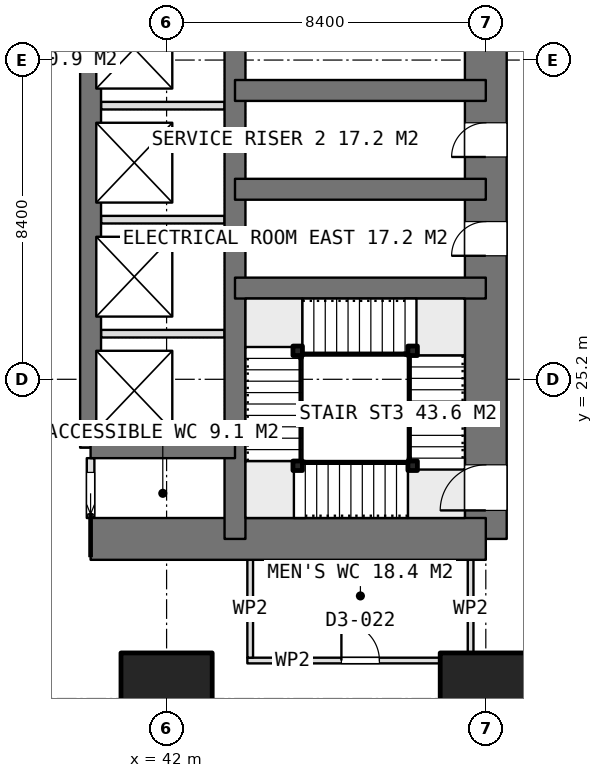
"""IFC4 building model, lengths in metres.
Left out: names, types, materials, properties, quantities, classifications, styles, units other than length and angle.
Written with IfcOpenShell. Run it as: python <this file> out.ifc"""

import sys

from ifc_helpers import new_model, si_unit, direction, frame, frame_2d, origin, origin_2d, place, context, subcontext, project, spatial, rectangle, extrude, element, fill, save


model = new_model("IFC4")
c1 = context("Model", 3, precision=1e-05, world=origin(), true_north=direction((0.0, 1.0)))
c2 = subcontext(c1, "Body", "Model", "MODEL_VIEW")
j1 = project(units=[si_unit("LENGTHUNIT", "METRE"), si_unit("PLANEANGLEUNIT", "RADIAN")], contexts=[c1])
p1 = place(None, origin())
s1 = spatial("IfcSite", under=j1, at=p1, CompositionType="ELEMENT")
p2 = place(p1, origin())
s2 = spatial("IfcBuilding", under=s1, at=p2, CompositionType="ELEMENT")
p3 = place(p2, frame((0.0, 0.0, 15.4)))
s3 = spatial("IfcBuildingStorey", under=s2, at=p3, CompositionType="ELEMENT", Elevation=15.4)
p4 = place(p3, frame((40.0, 21.0, 0.0), z_axis=(0.0, 0.0, 1.0), x_axis=(1.0, 0.0, 0.0)))
e1 = element("IfcWall", 1, at=p4, inside=s3, PredefinedType="SHEAR", context=c2, shape_type="SweptSolid", body=[
    extrude(rectangle(XDim=10.4, YDim=1.1, at=frame_2d((5.2, 0.0))), origin(), (0.0, 0.0, 1.0), 5.0),
])
p5 = place(p3, frame((50.4, 21.0, 0.0), z_axis=(0.0, 0.0, 1.0), x_axis=(0.0, 1.0, 0.0)))
e2 = element("IfcWall", 2, at=p5, inside=s3, PredefinedType="SHEAR", context=c2, shape_type="SweptSolid", body=[
    extrude(rectangle(XDim=25.2, YDim=1.1, at=frame_2d((12.6, 0.0))), origin(), (0.0, 0.0, 1.0), 5.0),
])
p6 = place(p5, frame((16.2, 0.0, 0.0)))
e3 = element("IfcOpeningElement", 3, at=p6, cuts=e2, PredefinedType="OPENING", context=c2, shape_type="SweptSolid", body=[
    extrude(rectangle(XDim=1.2, YDim=2.1, at=frame_2d((0.6, 1.05))), frame((0.0, 0.56, 0.0), z_axis=(0.0, -1.0, 0.0), x_axis=(1.0, 0.0, 0.0)), (0.0, 0.0, 1.0), 1.12),
])
p7 = place(p5, frame((10.05, 0.0, 0.0)))
e4 = element("IfcOpeningElement", 4, at=p7, cuts=e2, PredefinedType="OPENING", context=c2, shape_type="SweptSolid", body=[
    extrude(rectangle(XDim=0.9, YDim=2.1, at=frame_2d((0.45, 1.05))), frame((0.0, 0.56, 0.0), z_axis=(0.0, -1.0, 0.0), x_axis=(1.0, 0.0, 0.0)), (0.0, 0.0, 1.0), 1.12),
])
p8 = place(p5, frame((7.45, 0.0, 0.0)))
e5 = element("IfcOpeningElement", 5, at=p8, cuts=e2, PredefinedType="OPENING", context=c2, shape_type="SweptSolid", body=[
    extrude(rectangle(XDim=0.9, YDim=2.1, at=frame_2d((0.45, 1.05))), frame((0.0, 0.56, 0.0), z_axis=(0.0, -1.0, 0.0), x_axis=(1.0, 0.0, 0.0)), (0.0, 0.0, 1.0), 1.12),
])
p9 = place(p5, frame((0.75, 0.0, 0.0)))
e6 = element("IfcOpeningElement", 6, at=p9, cuts=e2, PredefinedType="OPENING", context=c2, shape_type="SweptSolid", body=[
    extrude(rectangle(XDim=1.2, YDim=2.1, at=frame_2d((0.6, 1.05))), frame((0.0, 0.56, 0.0), z_axis=(0.0, -1.0, 0.0), x_axis=(1.0, 0.0, 0.0)), (0.0, 0.0, 1.0), 1.12),
])
p10 = place(p3, frame((43.8, 21.0, 0.0), z_axis=(0.0, 0.0, 1.0), x_axis=(0.0, 1.0, 0.0)))
e7 = element("IfcWall", 7, at=p10, inside=s3, PredefinedType="SHEAR", context=c2, shape_type="SweptSolid", body=[
    extrude(rectangle(XDim=25.2, YDim=0.55, at=frame_2d((12.6, 0.0))), origin(), (0.0, 0.0, 1.0), 5.0),
])
p11 = place(p3, frame((40.0, 23.4, 0.0), z_axis=(0.0, 0.0, 1.0), x_axis=(0.0, 1.0, 0.0)))
e8 = element("IfcWall", 8, at=p11, inside=s3, PredefinedType="SHEAR", context=c2, shape_type="SweptSolid", body=[
    extrude(rectangle(XDim=18.0, YDim=0.55, at=frame_2d((9.0, 0.0))), origin(), (0.0, 0.0, 1.0), 5.0),
])
p12 = place(p3, frame((40.0, 23.4, 0.0), z_axis=(0.0, 0.0, 1.0), x_axis=(1.0, 0.0, 0.0)))
e9 = element("IfcWall", 9, at=p12, inside=s3, PredefinedType="SHEAR", context=c2, shape_type="SweptSolid", body=[
    extrude(rectangle(XDim=3.8, YDim=0.55, at=frame_2d((1.9, 0.0))), origin(), (0.0, 0.0, 1.0), 5.0),
])
for number, where, z_axis, x_axis in (
    (10, (43.8, 27.6, 0.0), (0.0, 0.0, 1.0), (1.0, 0.0, 0.0)),
    (11, (43.8, 30.2, 0.0), (0.0, 0.0, 1.0), (1.0, 0.0, 0.0)),
    (12, (43.8, 32.8, 0.0), (0.0, 0.0, 1.0), (1.0, 0.0, 0.0)),
):
    element("IfcWall", number, at=place(p3, frame(where, z_axis=z_axis, x_axis=x_axis)), inside=s3, PredefinedType="SHEAR", context=c2, shape_type="SweptSolid", body=[
        extrude(rectangle(XDim=6.6, YDim=0.55, at=frame_2d((3.3, 0.0))), origin(), (0.0, 0.0, 1.0), 5.0),
    ])
for number, where, z_axis, x_axis in (
    (13, (42.0, 16.8, 0.0), (0.0, 0.0, 1.0), (1.0, 0.0, 0.0)),
    (14, (50.4, 16.8, 0.0), (0.0, 0.0, 1.0), (1.0, 0.0, 0.0)),
):
    element("IfcColumn", number, at=place(p3, frame(where, z_axis=z_axis, x_axis=x_axis)), inside=s3, PredefinedType="COLUMN", context=c2, shape_type="SweptSolid", body=[
        extrude(rectangle(XDim=2.4, YDim=2.4, at=origin_2d()), origin(), (0.0, 0.0, 1.0), 5.0),
    ])
for number, where, z_axis, x_axis in (
    (15, (40.275, 26.4, 0.0), (0.0, 0.0, 1.0), (1.0, 0.0, 0.0)),
    (16, (40.275, 29.4, 0.0), (0.0, 0.0, 1.0), (1.0, 0.0, 0.0)),
    (17, (40.275, 32.4, 0.0), (0.0, 0.0, 1.0), (1.0, 0.0, 0.0)),
):
    element("IfcWall", number, at=place(p3, frame(where, z_axis=z_axis, x_axis=x_axis)), inside=s3, PredefinedType="PARTITIONING", context=c2, shape_type="SweptSolid", body=[
        extrude(rectangle(XDim=3.25, YDim=0.2, at=frame_2d((1.625, 0.0))), origin(), (0.0, 0.0, 1.0), 4.7),
    ])
p13 = place(p3, frame((40.0, 21.55, 0.0), z_axis=(0.0, 0.0, 1.0), x_axis=(0.0, 1.0, 0.0)))
e18 = element("IfcWall", 18, at=p13, inside=s3, PredefinedType="PARTITIONING", context=c2, shape_type="SweptSolid", body=[
    extrude(rectangle(XDim=1.575, YDim=0.2, at=frame_2d((0.788, 0.0))), origin(), (0.0, 0.0, 1.0), 4.7),
])
p14 = place(p13, frame((0.1, 0.0, 0.0)))
e19 = element("IfcOpeningElement", 19, at=p14, cuts=e18, PredefinedType="OPENING", context=c2, shape_type="SweptSolid", body=[
    extrude(rectangle(XDim=1.1, YDim=2.1, at=frame_2d((0.55, 1.05))), frame((0.0, 0.11, 0.0), z_axis=(0.0, -1.0, 0.0), x_axis=(1.0, 0.0, 0.0)), (0.0, 0.0, 1.0), 0.22),
])
p15 = place(p3, frame((44.125, 17.8, 0.0), z_axis=(0.0, 0.0, 1.0), x_axis=(1.0, 0.0, 0.0)))
e20 = element("IfcWall", 20, at=p15, inside=s3, PredefinedType="PARTITIONING", context=c2, shape_type="SweptSolid", body=[
    extrude(rectangle(XDim=5.95, YDim=0.15, at=frame_2d((2.975, 0.0))), origin(), (0.0, 0.0, 1.0), 4.7),
])
p16 = place(p15, frame((2.475, 0.0, 0.0)))
e21 = element("IfcOpeningElement", 21, at=p16, cuts=e20, PredefinedType="OPENING", context=c2, shape_type="SweptSolid", body=[
    extrude(rectangle(XDim=1.0, YDim=2.1, at=frame_2d((0.5, 1.05))), frame((0.0, 0.085, 0.0), z_axis=(0.0, -1.0, 0.0), x_axis=(1.0, 0.0, 0.0)), (0.0, 0.0, 1.0), 0.17),
])
for number, where, z_axis, x_axis in (
    (22, (44.2, 17.875, 0.0), (0.0, 0.0, 1.0), (0.0, 1.0, 0.0)),
    (23, (50.0, 17.875, 0.0), (0.0, 0.0, 1.0), (0.0, 1.0, 0.0)),
):
    element("IfcWall", number, at=place(p3, frame(where, z_axis=z_axis, x_axis=x_axis)), inside=s3, PredefinedType="PARTITIONING", context=c2, shape_type="SweptSolid", body=[
        extrude(rectangle(XDim=2.575, YDim=0.15, at=frame_2d((1.288, 0.0))), origin(), (0.0, 0.0, 1.0), 4.7),
    ])
for number, where, z_axis, x_axis in (
    (24, (48.475, 22.925, 0.0), (0.0, 0.0, 1.0), (1.0, 0.0, 0.0)),
    (25, (45.45, 22.925, 0.0), (0.0, 0.0, 1.0), (1.0, 0.0, 0.0)),
    (26, (45.45, 25.95, 0.0), (0.0, 0.0, 1.0), (1.0, 0.0, 0.0)),
    (27, (48.475, 25.95, 0.0), (0.0, 0.0, 1.0), (1.0, 0.0, 0.0)),
):
    element("IfcColumn", number, at=place(p3, frame(where, z_axis=z_axis, x_axis=x_axis)), inside=s3, PredefinedType="COLUMN", context=c2, shape_type="SweptSolid", body=[
        extrude(rectangle(XDim=0.25, YDim=0.25, at=origin_2d()), origin(), (0.0, 0.0, 1.0), 5.0),
    ])
p17 = place(p7, origin())
e28 = element("IfcDoor", 28, at=p17, inside=s3, OperationType="SINGLE_SWING_LEFT", PredefinedType="DOOR", context=c2, shape_type="SweptSolid", body=[
    extrude(rectangle(XDim=0.9, YDim=2.1, at=frame_2d((0.45, 1.05))), frame((0.0, 0.025, 0.0), z_axis=(0.0, -1.0, 0.0), x_axis=(1.0, 0.0, 0.0)), (0.0, 0.0, 1.0), 0.05),
])
fill(e4, e28)
p18 = place(p8, origin())
e29 = element("IfcDoor", 29, at=p18, inside=s3, OperationType="SINGLE_SWING_LEFT", PredefinedType="DOOR", context=c2, shape_type="SweptSolid", body=[
    extrude(rectangle(XDim=0.9, YDim=2.1, at=frame_2d((0.45, 1.05))), frame((0.0, 0.025, 0.0), z_axis=(0.0, -1.0, 0.0), x_axis=(1.0, 0.0, 0.0)), (0.0, 0.0, 1.0), 0.05),
])
fill(e5, e29)
p19 = place(p14, origin())
e30 = element("IfcDoor", 30, at=p19, inside=s3, OperationType="SLIDING_TO_LEFT", PredefinedType="DOOR", context=c2, shape_type="SweptSolid", body=[
    extrude(rectangle(XDim=1.1, YDim=2.1, at=frame_2d((0.55, 1.05))), frame((0.0, 0.025, 0.0), z_axis=(0.0, -1.0, 0.0), x_axis=(1.0, 0.0, 0.0)), (0.0, 0.0, 1.0), 0.05),
])
fill(e19, e30)
p20 = place(p16, origin())
e31 = element("IfcDoor", 31, at=p20, inside=s3, OperationType="SINGLE_SWING_LEFT", PredefinedType="DOOR", context=c2, shape_type="SweptSolid", body=[
    extrude(rectangle(XDim=1.0, YDim=2.1, at=frame_2d((0.5, 1.05))), frame((0.0, 0.025, 0.0), z_axis=(0.0, -1.0, 0.0), x_axis=(1.0, 0.0, 0.0)), (0.0, 0.0, 1.0), 0.05),
])
fill(e21, e31)
p21 = place(p9, origin())
e32 = element("IfcDoor", 32, at=p21, inside=s3, OperationType="SINGLE_SWING_RIGHT", PredefinedType="DOOR", context=c2, shape_type="SweptSolid", body=[
    extrude(rectangle(XDim=1.2, YDim=2.1, at=frame_2d((0.6, 1.05))), frame((0.0, 0.025, 0.0), z_axis=(0.0, -1.0, 0.0), x_axis=(1.0, 0.0, 0.0)), (0.0, 0.0, 1.0), 0.05),
])
fill(e6, e32)
save(model, sys.argv[1])
